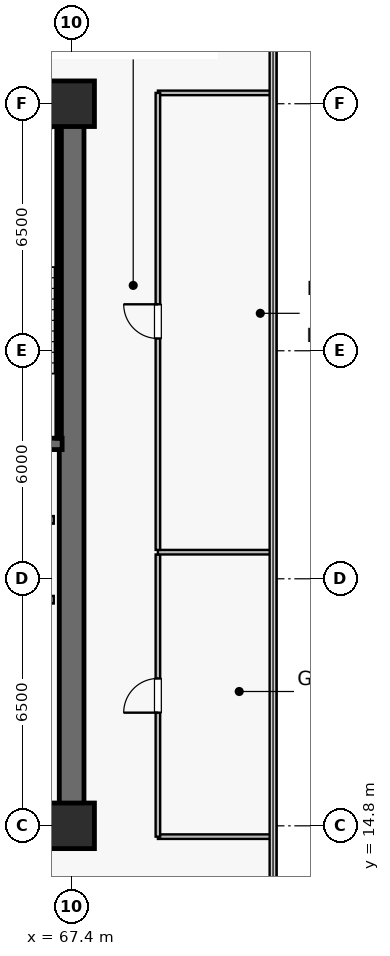
"""IFC4 building model, lengths in metres.
Left out: names, types, materials, properties, quantities, classifications, styles, units other than length and angle.
Written with IfcOpenShell. Run it as: python <this file> out.ifc"""

import sys

from ifc_helpers import new_model, si_unit, direction, frame, frame_2d, origin, origin_2d, place, context, subcontext, project, spatial, rectangle, extrude, source, transform, mapped, element, fill, save


model = new_model("IFC4")
c1 = context("Model", 3, precision=1e-05, world=origin(), true_north=direction((0.0, 1.0)))
c2 = subcontext(c1, "Body", "Model", "MODEL_VIEW")
j1 = project(units=[si_unit("LENGTHUNIT", "METRE"), si_unit("PLANEANGLEUNIT", "RADIAN")], contexts=[c1])
p1 = place(None, origin())
s1 = spatial("IfcSite", under=j1, at=p1, CompositionType="ELEMENT")
p2 = place(p1, origin())
s2 = spatial("IfcBuilding", under=s1, at=p2, CompositionType="ELEMENT")
p3 = place(p2, frame((0.0, 0.0, 178.9)))
s3 = spatial("IfcBuildingStorey", under=s2, at=p3, CompositionType="ELEMENT", Elevation=178.9)
p4 = place(p3, frame((52.275, 14.8, 0.0), z_axis=(0.0, 0.0, 1.0), x_axis=(1.0, 0.0, 0.0)))
e1 = element("IfcWall", 1, at=p4, inside=s3, PredefinedType="SHEAR", context=c2, shape_type="SweptSolid", body=[
    extrude(rectangle(XDim=15.45, YDim=0.65, at=frame_2d((7.725, 0.0))), origin(), (0.0, 0.0, 1.0), 3.79),
])
p5 = place(p3, frame((52.275, 33.8, 0.0), z_axis=(0.0, 0.0, 1.0), x_axis=(1.0, 0.0, 0.0)))
e2 = element("IfcWall", 2, at=p5, inside=s3, PredefinedType="SHEAR", context=c2, shape_type="SweptSolid", body=[
    extrude(rectangle(XDim=15.45, YDim=0.65, at=frame_2d((7.725, 0.0))), origin(), (0.0, 0.0, 1.0), 3.79),
])
p6 = place(p5, frame((7.675, 0.0, 0.0)))
e3 = element("IfcOpeningElement", 3, at=p6, cuts=e2, PredefinedType="OPENING", context=c2, shape_type="SweptSolid", body=[
    extrude(rectangle(XDim=0.95, YDim=2.15, at=frame_2d((0.475, 1.075))), frame((0.0, 0.335, 0.0), z_axis=(0.0, -1.0, 0.0), x_axis=(1.0, 0.0, 0.0)), (0.0, 0.0, 1.0), 0.67),
])
p7 = place(p5, frame((2.61, 0.0, 0.0)))
e4 = element("IfcOpeningElement", 4, at=p7, cuts=e2, PredefinedType="OPENING", context=c2, shape_type="SweptSolid", body=[
    extrude(rectangle(XDim=0.95, YDim=2.15, at=frame_2d((0.475, 1.075))), frame((0.0, 0.335, 0.0), z_axis=(0.0, -1.0, 0.0), x_axis=(1.0, 0.0, 0.0)), (0.0, 0.0, 1.0), 0.67),
])
p8 = place(p3, frame((67.4, 15.125, 0.0), z_axis=(0.0, 0.0, 1.0), x_axis=(0.0, 1.0, 0.0)))
e5 = element("IfcWall", 5, at=p8, inside=s3, PredefinedType="SHEAR", context=c2, shape_type="SweptSolid", body=[
    extrude(rectangle(XDim=18.35, YDim=0.65, at=frame_2d((9.175, 0.0))), origin(), (0.0, 0.0, 1.0), 3.79),
])
p9 = place(p3, frame((63.35, 24.85, 0.0), z_axis=(0.0, 0.0, 1.0), x_axis=(1.0, 0.0, 0.0)))
e6 = element("IfcWall", 6, at=p9, inside=s3, PredefinedType="SHEAR", context=c2, shape_type="SweptSolid", body=[
    extrude(rectangle(XDim=3.8, YDim=0.3, at=frame_2d((1.9, 0.0))), origin(), (0.0, 0.0, 1.0), 3.79),
])
p10 = place(p3, frame((63.35, 33.4, 0.0), z_axis=(0.0, 0.0, 1.0), x_axis=(1.0, 0.0, 0.0)))
e7 = element("IfcWall", 7, at=p10, inside=s3, PredefinedType="SOLIDWALL", context=c2, shape_type="SweptSolid", body=[
    extrude(rectangle(XDim=3.72, YDim=0.12, at=frame_2d((1.86, 0.0))), origin(), (0.0, 0.0, 1.0), 3.79),
])
p11 = place(p3, frame((67.07, 25.0, 0.0), z_axis=(0.0, 0.0, 1.0), x_axis=(0.0, 1.0, 0.0)))
e8 = element("IfcWall", 8, at=p11, inside=s3, PredefinedType="SOLIDWALL", context=c2, shape_type="SweptSolid", body=[
    extrude(rectangle(XDim=8.32, YDim=0.12, at=frame_2d((4.16, 0.0))), origin(), (0.0, 0.0, 1.0), 3.79),
])
m1 = source(origin(), c2, "Body", "SweptSolid", [
    extrude(rectangle(XDim=1.2, YDim=1.2, at=origin_2d()), origin(), (0.0, 0.0, 1.0), 4.1),
])
for number, where, z_axis, x_axis in (
    (9, (67.4, 14.8, 0.0), (0.0, 0.0, 1.0), (1.0, 0.0, 0.0)),
    (10, (67.4, 33.8, 0.0), (0.0, 0.0, 1.0), (1.0, 0.0, 0.0)),
):
    element("IfcColumn", number, at=place(p3, frame(where, z_axis=z_axis, x_axis=x_axis)), inside=s3, PredefinedType="COLUMN", context=c2, shape_type="MappedRepresentation", body=[
        mapped(m1, transform((0.0, 0.0, 0.0), scale=1.0)),
    ])
for number, where, z_axis, x_axis in (
    (11, (64.67, 20.75, 0.0), (0.0, 0.0, 1.0), (1.0, 0.0, 0.0)),
    (12, (64.67, 22.85, 0.0), (0.0, 0.0, 1.0), (1.0, 0.0, 0.0)),
):
    element("IfcWall", number, at=place(p3, frame(where, z_axis=z_axis, x_axis=x_axis)), inside=s3, PredefinedType="SOLIDWALL", context=c2, shape_type="SweptSolid", body=[
        extrude(rectangle(XDim=2.26, YDim=0.2, at=frame_2d((1.13, 0.0))), origin(), (0.0, 0.0, 1.0), 3.79),
    ])
for number, where, z_axis, x_axis in (
    (13, (69.67, 14.515, 0.0), (0.0, 0.0, 1.0), (1.0, 0.0, 0.0)),
    (14, (69.67, 34.085, 0.0), (0.0, 0.0, 1.0), (1.0, 0.0, 0.0)),
):
    element("IfcWall", number, at=place(p3, frame(where, z_axis=z_axis, x_axis=x_axis)), inside=s3, PredefinedType="PARTITIONING", context=c2, shape_type="SweptSolid", body=[
        extrude(rectangle(XDim=3.02, YDim=0.12, at=frame_2d((1.51, 0.0))), origin(), (0.0, 0.0, 1.0), 3.79),
    ])
p12 = place(p3, frame((69.67, 14.515, 0.0), z_axis=(0.0, 0.0, 1.0), x_axis=(0.0, 1.0, 0.0)))
e15 = element("IfcWall", 15, at=p12, inside=s3, PredefinedType="PARTITIONING", context=c2, shape_type="SweptSolid", body=[
    extrude(rectangle(XDim=7.425, YDim=0.12, at=frame_2d((3.712, 0.0))), origin(), (0.0, 0.0, 1.0), 3.79),
])
p13 = place(p12, frame((3.262, 0.0, 0.0)))
e16 = element("IfcOpeningElement", 16, at=p13, cuts=e15, PredefinedType="OPENING", context=c2, shape_type="SweptSolid", body=[
    extrude(rectangle(XDim=0.9, YDim=2.1, at=frame_2d((0.45, 1.05))), frame((0.0, 0.07, 0.0), z_axis=(0.0, -1.0, 0.0), x_axis=(1.0, 0.0, 0.0)), (0.0, 0.0, 1.0), 0.14),
])
p14 = place(p3, frame((69.67, 22.0, 0.0), z_axis=(0.0, 0.0, 1.0), x_axis=(1.0, 0.0, 0.0)))
e17 = element("IfcWall", 17, at=p14, inside=s3, PredefinedType="PARTITIONING", context=c2, shape_type="SweptSolid", body=[
    extrude(rectangle(XDim=3.02, YDim=0.12, at=frame_2d((1.51, 0.0))), origin(), (0.0, 0.0, 1.0), 3.79),
])
p15 = place(p3, frame((69.67, 22.06, 0.0), z_axis=(0.0, 0.0, 1.0), x_axis=(0.0, 1.0, 0.0)))
e18 = element("IfcWall", 18, at=p15, inside=s3, PredefinedType="PARTITIONING", context=c2, shape_type="SweptSolid", body=[
    extrude(rectangle(XDim=12.025, YDim=0.12, at=frame_2d((6.012, 0.0))), origin(), (0.0, 0.0, 1.0), 3.79),
])
p16 = place(p15, frame((5.562, 0.0, 0.0)))
e19 = element("IfcOpeningElement", 19, at=p16, cuts=e18, PredefinedType="OPENING", context=c2, shape_type="SweptSolid", body=[
    extrude(rectangle(XDim=0.9, YDim=2.1, at=frame_2d((0.45, 1.05))), frame((0.0, 0.07, 0.0), z_axis=(0.0, -1.0, 0.0), x_axis=(1.0, 0.0, 0.0)), (0.0, 0.0, 1.0), 0.14),
])
m2 = source(origin(), c2, "Body", "SweptSolid", [
    extrude(rectangle(XDim=0.9, YDim=2.1, at=frame_2d((0.45, 1.05))), frame((0.0, 0.025, 0.0), z_axis=(0.0, -1.0, 0.0), x_axis=(1.0, 0.0, 0.0)), (0.0, 0.0, 1.0), 0.05),
])
p17 = place(p13, origin())
e20 = element("IfcDoor", 20, at=p17, inside=s3, OperationType="SINGLE_SWING_LEFT", PredefinedType="DOOR", context=c2, shape_type="MappedRepresentation", body=[
    mapped(m2, transform((0.0, 0.0, 0.0), scale=1.0)),
])
fill(e16, e20)
p18 = place(p16, origin())
e21 = element("IfcDoor", 21, at=p18, inside=s3, OperationType="SINGLE_SWING_RIGHT", PredefinedType="DOOR", context=c2, shape_type="MappedRepresentation", body=[
    mapped(m2, transform((0.0, 0.0, 0.0), scale=1.0)),
])
fill(e19, e21)
save(model, sys.argv[1])
